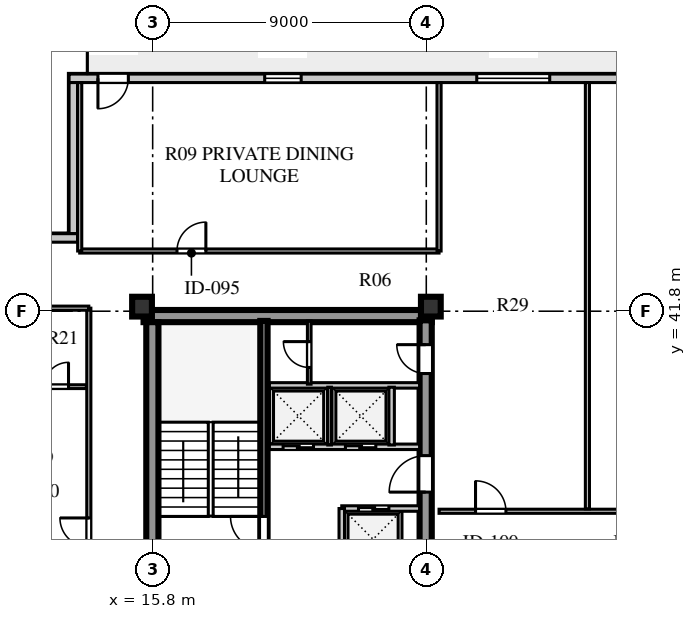
"""IFC4 building model, lengths in metres.
Left out: names, types, materials, properties, quantities, classifications, styles, units other than length and angle.
Written with IfcOpenShell. Run it as: python <this file> out.ifc"""

import sys

from ifc_helpers import new_model, si_unit, direction, frame, frame_2d, origin, origin_2d, place, context, subcontext, project, spatial, rectangle, extrude, element, fill, save


model = new_model("IFC4")
c1 = context("Model", 3, precision=1e-05, world=origin(), true_north=direction((0.0, 1.0)))
c2 = subcontext(c1, "Body", "Model", "MODEL_VIEW")
j1 = project(units=[si_unit("LENGTHUNIT", "METRE"), si_unit("PLANEANGLEUNIT", "RADIAN")], contexts=[c1])
p1 = place(None, origin())
s1 = spatial("IfcSite", under=j1, at=p1, CompositionType="ELEMENT")
p2 = place(p1, origin())
s2 = spatial("IfcBuilding", under=s1, at=p2, CompositionType="ELEMENT")
p3 = place(p2, frame((0.0, 0.0, 229.7)))
s3 = spatial("IfcBuildingStorey", under=s2, at=p3, CompositionType="ELEMENT", Elevation=229.7)
p4 = place(p3, frame((15.5, 41.64, 0.0), z_axis=(0.0, 0.0, 1.0), x_axis=(1.0, 0.0, 0.0)))
e1 = element("IfcWall", 1, at=p4, inside=s3, PredefinedType="SHEAR", context=c2, shape_type="SweptSolid", body=[
    extrude(rectangle(XDim=9.48, YDim=0.4, at=frame_2d((4.74, 0.0))), origin(), (0.0, 0.0, 1.0), 3.66),
])
p5 = place(p3, frame((15.79, 15.81, 0.0), z_axis=(0.0, 0.0, 1.0), x_axis=(0.0, 1.0, 0.0)))
e2 = element("IfcWall", 2, at=p5, inside=s3, PredefinedType="SHEAR", context=c2, shape_type="SweptSolid", body=[
    extrude(rectangle(XDim=25.63, YDim=0.4, at=frame_2d((12.815, 0.0))), origin(), (0.0, 0.0, 1.0), 3.66),
])
p6 = place(p3, frame((24.78, 15.74, 0.0), z_axis=(0.0, 0.0, 1.0), x_axis=(0.0, 1.0, 0.0)))
e3 = element("IfcWall", 3, at=p6, inside=s3, PredefinedType="SHEAR", context=c2, shape_type="SweptSolid", body=[
    extrude(rectangle(XDim=25.76, YDim=0.4, at=frame_2d((12.88, 0.0))), origin(), (0.0, 0.0, 1.0), 3.66),
])
p7 = place(p6, frame((1.61, 0.0, 0.0)))
e4 = element("IfcOpeningElement", 4, at=p7, cuts=e3, PredefinedType="OPENING", context=c2, shape_type="SweptSolid", body=[
    extrude(rectangle(XDim=1.2, YDim=2.1, at=frame_2d((0.6, 1.05))), frame((0.0, 0.21, 0.0), z_axis=(0.0, -1.0, 0.0), x_axis=(1.0, 0.0, 0.0)), (0.0, 0.0, 1.0), 0.42),
])
p8 = place(p6, frame((6.78, 0.0, 0.0)))
e5 = element("IfcOpeningElement", 5, at=p8, cuts=e3, PredefinedType="OPENING", context=c2, shape_type="SweptSolid", body=[
    extrude(rectangle(XDim=0.85, YDim=2.06, at=frame_2d((0.425, 1.03))), frame((0.0, 0.21, 0.0), z_axis=(0.0, -1.0, 0.0), x_axis=(1.0, 0.0, 0.0)), (0.0, 0.0, 1.0), 0.42),
])
p9 = place(p6, frame((12.11, 0.0, 0.0)))
e6 = element("IfcOpeningElement", 6, at=p9, cuts=e3, PredefinedType="OPENING", context=c2, shape_type="SweptSolid", body=[
    extrude(rectangle(XDim=1.5, YDim=2.12, at=frame_2d((0.75, 1.06))), frame((0.0, 0.21, 0.0), z_axis=(0.0, -1.0, 0.0), x_axis=(1.0, 0.0, 0.0)), (0.0, 0.0, 1.0), 0.42),
])
p10 = place(p6, frame((20.11, 0.0, 0.0)))
e7 = element("IfcOpeningElement", 7, at=p10, cuts=e3, PredefinedType="OPENING", context=c2, shape_type="SweptSolid", body=[
    extrude(rectangle(XDim=1.2, YDim=2.12, at=frame_2d((0.6, 1.06))), frame((0.0, 0.21, 0.0), z_axis=(0.0, -1.0, 0.0), x_axis=(1.0, 0.0, 0.0)), (0.0, 0.0, 1.0), 0.42),
])
p11 = place(p6, frame((24.01, 0.0, 0.0)))
e8 = element("IfcOpeningElement", 8, at=p11, cuts=e3, PredefinedType="OPENING", context=c2, shape_type="SweptSolid", body=[
    extrude(rectangle(XDim=0.95, YDim=2.1, at=frame_2d((0.475, 1.05))), frame((0.0, 0.21, 0.0), z_axis=(0.0, -1.0, 0.0), x_axis=(1.0, 0.0, 0.0)), (0.0, 0.0, 1.0), 0.42),
])
for number, where, z_axis, x_axis in (
    (9, (15.45, 41.95, 0.0), (0.0, 0.0, 1.0), (1.0, 0.0, 0.0)),
    (10, (24.95, 41.95, 0.0), (0.0, 0.0, 1.0), (1.0, 0.0, 0.0)),
):
    element("IfcColumn", number, at=place(p3, frame(where, z_axis=z_axis, x_axis=x_axis)), inside=s3, PredefinedType="COLUMN", context=c2, shape_type="SweptSolid", body=[
        extrude(rectangle(XDim=0.65, YDim=0.65, at=origin_2d()), origin(), (0.0, 0.0, 1.0), 3.66),
    ])
p12 = place(p3, frame((45.55, 49.46, 0.0), z_axis=(0.0, 0.0, 1.0), x_axis=(-1.0, 0.0, 0.0)))
e11 = element("IfcWall", 11, at=p12, inside=s3, PredefinedType="STANDARD", context=c2, shape_type="SweptSolid", body=[
    extrude(rectangle(XDim=32.5, YDim=0.28, at=frame_2d((16.25, 0.0))), origin(), (0.0, 0.0, 1.0), 3.66),
])
p13 = place(p12, frame((30.55, 0.0, 0.0)))
e12 = element("IfcOpeningElement", 12, at=p13, cuts=e11, PredefinedType="OPENING", context=c2, shape_type="SweptSolid", body=[
    extrude(rectangle(XDim=1.0, YDim=2.05, at=frame_2d((0.5, 1.025))), frame((0.0, 0.15, 0.0), z_axis=(0.0, -1.0, 0.0), x_axis=(1.0, 0.0, 0.0)), (0.0, 0.0, 1.0), 0.3),
])
p14 = place(p12, frame((24.865, 0.0, 0.8)))
e13 = element("IfcOpeningElement", 13, at=p14, cuts=e11, PredefinedType="OPENING", context=c2, shape_type="SweptSolid", body=[
    extrude(rectangle(XDim=1.2, YDim=1.75, at=frame_2d((0.6, 0.875))), frame((0.0, 0.15, 0.0), z_axis=(0.0, -1.0, 0.0), x_axis=(1.0, 0.0, 0.0)), (0.0, 0.0, 1.0), 0.3),
])
p15 = place(p12, frame((16.69, 0.0, 0.8)))
e14 = element("IfcOpeningElement", 14, at=p15, cuts=e11, PredefinedType="OPENING", context=c2, shape_type="SweptSolid", body=[
    extrude(rectangle(XDim=2.4, YDim=2.05, at=frame_2d((1.2, 1.025))), frame((0.0, 0.15, 0.0), z_axis=(0.0, -1.0, 0.0), x_axis=(1.0, 0.0, 0.0)), (0.0, 0.0, 1.0), 0.3),
])
p16 = place(p12, frame((12.09, 0.0, 0.8)))
e15 = element("IfcOpeningElement", 15, at=p16, cuts=e11, PredefinedType="OPENING", context=c2, shape_type="SweptSolid", body=[
    extrude(rectangle(XDim=2.1, YDim=1.95, at=frame_2d((1.05, 0.975))), frame((0.0, 0.15, 0.0), z_axis=(0.0, -1.0, 0.0), x_axis=(1.0, 0.0, 0.0)), (0.0, 0.0, 1.0), 0.3),
])
p17 = place(p12, frame((4.795, 0.0, 0.8)))
e16 = element("IfcOpeningElement", 16, at=p17, cuts=e11, PredefinedType="OPENING", context=c2, shape_type="SweptSolid", body=[
    extrude(rectangle(XDim=1.35, YDim=1.9, at=frame_2d((0.675, 0.95))), frame((0.0, 0.15, 0.0), z_axis=(0.0, -1.0, 0.0), x_axis=(1.0, 0.0, 0.0)), (0.0, 0.0, 1.0), 0.3),
])
p18 = place(p3, frame((13.19, 49.32, 0.0), z_axis=(0.0, 0.0, 1.0), x_axis=(0.0, -1.0, 0.0)))
e17 = element("IfcWall", 17, at=p18, inside=s3, PredefinedType="STANDARD", context=c2, shape_type="SweptSolid", body=[
    extrude(rectangle(XDim=4.97, YDim=0.28, at=frame_2d((2.485, 0.0))), origin(), (0.0, 0.0, 1.0), 3.66),
])
p19 = place(p3, frame((13.33, 44.21, 0.0), z_axis=(0.0, 0.0, 1.0), x_axis=(-1.0, 0.0, 0.0)))
e18 = element("IfcWall", 18, at=p19, inside=s3, PredefinedType="STANDARD", context=c2, shape_type="SweptSolid", body=[
    extrude(rectangle(XDim=5.53, YDim=0.28, at=frame_2d((2.765, 0.0))), origin(), (0.0, 0.0, 1.0), 3.66),
])
p20 = place(p3, frame((19.46, 33.3, 0.0), z_axis=(0.0, 0.0, 1.0), x_axis=(0.0, 1.0, 0.0)))
e19 = element("IfcWall", 19, at=p20, inside=s3, PredefinedType="SHEAR", context=c2, shape_type="SweptSolid", body=[
    extrude(rectangle(XDim=8.18, YDim=0.24, at=frame_2d((4.09, 0.0))), origin(), (0.0, 0.0, 1.0), 3.9),
])
p21 = place(p20, frame((0.65, 0.0, 0.0)))
e20 = element("IfcOpeningElement", 20, at=p21, cuts=e19, PredefinedType="OPENING", context=c2, shape_type="SweptSolid", body=[
    extrude(rectangle(XDim=1.1, YDim=2.1, at=frame_2d((0.55, 1.05))), frame((0.0, 0.13, 0.0), z_axis=(0.0, -1.0, 0.0), x_axis=(1.0, 0.0, 0.0)), (0.0, 0.0, 1.0), 0.26),
])
p22 = place(p3, frame((22.02, 35.31, 0.0), z_axis=(0.0, 0.0, 1.0), x_axis=(1.0, 0.0, 0.0)))
e21 = element("IfcWall", 21, at=p22, inside=s3, PredefinedType="SOLIDWALL", context=c2, shape_type="SweptSolid", body=[
    extrude(rectangle(XDim=2.56, YDim=0.18, at=frame_2d((1.28, 0.0))), origin(), (0.0, 0.0, 1.0), 3.66),
])
p23 = place(p22, frame((0.55, 0.0, 0.0)))
e22 = element("IfcOpeningElement", 22, at=p23, cuts=e21, PredefinedType="OPENING", context=c2, shape_type="SweptSolid", body=[
    extrude(rectangle(XDim=1.0, YDim=2.1, at=frame_2d((0.5, 1.05))), frame((0.0, 0.1, 0.0), z_axis=(0.0, -1.0, 0.0), x_axis=(1.0, 0.0, 0.0)), (0.0, 0.0, 1.0), 0.2),
])
p24 = place(p3, frame((22.02, 33.3, 0.0), z_axis=(0.0, 0.0, 1.0), x_axis=(0.0, 1.0, 0.0)))
e23 = element("IfcWall", 23, at=p24, inside=s3, PredefinedType="SOLIDWALL", context=c2, shape_type="SweptSolid", body=[
    extrude(rectangle(XDim=2.01, YDim=0.18, at=frame_2d((1.005, 0.0))), origin(), (0.0, 0.0, 1.0), 3.66),
])
p25 = place(p3, frame((19.64, 37.34, 0.0), z_axis=(0.0, 0.0, 1.0), x_axis=(1.0, 0.0, 0.0)))
e24 = element("IfcWall", 24, at=p25, inside=s3, PredefinedType="SOLIDWALL", context=c2, shape_type="SweptSolid", body=[
    extrude(rectangle(XDim=4.94, YDim=0.18, at=frame_2d((2.47, 0.0))), origin(), (0.0, 0.0, 1.0), 3.66),
])
p26 = place(p25, frame((0.45, 0.0, 0.0)))
e25 = element("IfcOpeningElement", 25, at=p26, cuts=e24, PredefinedType="OPENING", context=c2, shape_type="SweptSolid", body=[
    extrude(rectangle(XDim=1.0, YDim=2.1, at=frame_2d((0.5, 1.05))), frame((0.0, 0.1, 0.0), z_axis=(0.0, -1.0, 0.0), x_axis=(1.0, 0.0, 0.0)), (0.0, 0.0, 1.0), 0.2),
])
p27 = place(p25, frame((2.5, 0.0, 0.0)))
e26 = element("IfcOpeningElement", 26, at=p27, cuts=e24, PredefinedType="OPENING", context=c2, shape_type="SweptSolid", body=[
    extrude(rectangle(XDim=1.0, YDim=2.1, at=frame_2d((0.5, 1.05))), frame((0.0, 0.1, 0.0), z_axis=(0.0, -1.0, 0.0), x_axis=(1.0, 0.0, 0.0)), (0.0, 0.0, 1.0), 0.2),
])
p28 = place(p3, frame((19.64, 39.36, 0.0), z_axis=(0.0, 0.0, 1.0), x_axis=(1.0, 0.0, 0.0)))
e27 = element("IfcWall", 27, at=p28, inside=s3, PredefinedType="SOLIDWALL", context=c2, shape_type="SweptSolid", body=[
    extrude(rectangle(XDim=4.94, YDim=0.18, at=frame_2d((2.47, 0.0))), origin(), (0.0, 0.0, 1.0), 3.66),
])
p29 = place(p3, frame((21.62, 37.4, 0.0), z_axis=(0.0, 0.0, 1.0), x_axis=(0.0, 1.0, 0.0)))
e28 = element("IfcWall", 28, at=p29, inside=s3, PredefinedType="PARTITIONING", context=c2, shape_type="SweptSolid", body=[
    extrude(rectangle(XDim=1.9, YDim=0.12, at=frame_2d((0.95, 0.0))), origin(), (0.0, 0.0, 1.0), 3.66),
])
p30 = place(p3, frame((23.66, 37.4, 0.0), z_axis=(0.0, 0.0, 1.0), x_axis=(0.0, 1.0, 0.0)))
e29 = element("IfcWall", 29, at=p30, inside=s3, PredefinedType="SOLIDWALL", context=c2, shape_type="SweptSolid", body=[
    extrude(rectangle(XDim=1.9, YDim=0.18, at=frame_2d((0.95, 0.0))), origin(), (0.0, 0.0, 1.0), 3.66),
])
p31 = place(p3, frame((20.95, 39.4, 0.0), z_axis=(0.0, 0.0, 1.0), x_axis=(0.0, 1.0, 0.0)))
e30 = element("IfcWall", 30, at=p31, inside=s3, PredefinedType="PARTITIONING", context=c2, shape_type="SweptSolid", body=[
    extrude(rectangle(XDim=2.08, YDim=0.12, at=frame_2d((1.04, 0.0))), origin(), (0.0, 0.0, 1.0), 3.66),
])
p32 = place(p31, frame((0.55, 0.0, 0.0)))
e31 = element("IfcOpeningElement", 31, at=p32, cuts=e30, PredefinedType="OPENING", context=c2, shape_type="SweptSolid", body=[
    extrude(rectangle(XDim=0.85, YDim=2.06, at=frame_2d((0.425, 1.03))), frame((0.0, 0.07, 0.0), z_axis=(0.0, -1.0, 0.0), x_axis=(1.0, 0.0, 0.0)), (0.0, 0.0, 1.0), 0.14),
])
p33 = place(p3, frame((25.22, 35.22, 0.0), z_axis=(0.0, 0.0, 1.0), x_axis=(1.0, 0.0, 0.0)))
e32 = element("IfcWall", 32, at=p33, inside=s3, PredefinedType="PARTITIONING", context=c2, shape_type="SweptSolid", body=[
    extrude(rectangle(XDim=9.5, YDim=0.135, at=frame_2d((4.75, 0.0))), origin(), (0.0, 0.0, 1.0), 3.66),
])
p34 = place(p33, frame((1.2, 0.0, 0.0)))
e33 = element("IfcOpeningElement", 33, at=p34, cuts=e32, PredefinedType="OPENING", context=c2, shape_type="SweptSolid", body=[
    extrude(rectangle(XDim=1.0, YDim=2.08, at=frame_2d((0.5, 1.04))), frame((0.0, 0.078, 0.0), z_axis=(0.0, -1.0, 0.0), x_axis=(1.0, 0.0, 0.0)), (0.0, 0.0, 1.0), 0.155),
])
p35 = place(p33, frame((6.2, 0.0, 0.0)))
e34 = element("IfcOpeningElement", 34, at=p35, cuts=e32, PredefinedType="OPENING", context=c2, shape_type="SweptSolid", body=[
    extrude(rectangle(XDim=0.9, YDim=2.08, at=frame_2d((0.45, 1.04))), frame((0.0, 0.078, 0.0), z_axis=(0.0, -1.0, 0.0), x_axis=(1.0, 0.0, 0.0)), (0.0, 0.0, 1.0), 0.155),
])
p36 = place(p3, frame((13.4, 43.78, 0.0), z_axis=(0.0, 0.0, 1.0), x_axis=(1.0, 0.0, 0.0)))
e35 = element("IfcWall", 35, at=p36, inside=s3, PredefinedType="PARTITIONING", context=c2, shape_type="SweptSolid", body=[
    extrude(rectangle(XDim=11.82, YDim=0.135, at=frame_2d((5.91, 0.0))), origin(), (0.0, 0.0, 1.0), 3.66),
])
p37 = place(p36, frame((3.2, 0.0, 0.0)))
e36 = element("IfcOpeningElement", 36, at=p37, cuts=e35, PredefinedType="OPENING", context=c2, shape_type="SweptSolid", body=[
    extrude(rectangle(XDim=0.95, YDim=2.08, at=frame_2d((0.475, 1.04))), frame((0.0, 0.078, 0.0), z_axis=(0.0, -1.0, 0.0), x_axis=(1.0, 0.0, 0.0)), (0.0, 0.0, 1.0), 0.155),
])
p38 = place(p3, frame((13.4, 43.78, 0.0), z_axis=(0.0, 0.0, 1.0), x_axis=(0.0, 1.0, 0.0)))
e37 = element("IfcWall", 37, at=p38, inside=s3, PredefinedType="PARTITIONING", context=c2, shape_type="SweptSolid", body=[
    extrude(rectangle(XDim=5.54, YDim=0.135, at=frame_2d((2.77, 0.0))), origin(), (0.0, 0.0, 1.0), 3.66),
])
p39 = place(p3, frame((25.22, 43.78, 0.0), z_axis=(0.0, 0.0, 1.0), x_axis=(0.0, 1.0, 0.0)))
e38 = element("IfcWall", 38, at=p39, inside=s3, PredefinedType="PARTITIONING", context=c2, shape_type="SweptSolid", body=[
    extrude(rectangle(XDim=5.54, YDim=0.135, at=frame_2d((2.77, 0.0))), origin(), (0.0, 0.0, 1.0), 3.21),
])
p40 = place(p3, frame((13.7, 15.3, 0.0), z_axis=(0.0, 0.0, 1.0), x_axis=(0.0, 1.0, 0.0)))
e39 = element("IfcWall", 39, at=p40, inside=s3, PredefinedType="PARTITIONING", context=c2, shape_type="SweptSolid", body=[
    extrude(rectangle(XDim=26.6, YDim=0.135, at=frame_2d((13.3, 0.0))), origin(), (0.0, 0.0, 1.0), 3.66),
])
p41 = place(p40, frame((0.65, 0.0, 0.0)))
e40 = element("IfcOpeningElement", 40, at=p41, cuts=e39, PredefinedType="OPENING", context=c2, shape_type="SweptSolid", body=[
    extrude(rectangle(XDim=0.95, YDim=2.1, at=frame_2d((0.475, 1.05))), frame((0.0, 0.078, 0.0), z_axis=(0.0, -1.0, 0.0), x_axis=(1.0, 0.0, 0.0)), (0.0, 0.0, 1.0), 0.155),
])
p42 = place(p40, frame((9.8, 0.0, 0.0)))
e41 = element("IfcOpeningElement", 41, at=p42, cuts=e39, PredefinedType="OPENING", context=c2, shape_type="SweptSolid", body=[
    extrude(rectangle(XDim=0.95, YDim=2.1, at=frame_2d((0.475, 1.05))), frame((0.0, 0.078, 0.0), z_axis=(0.0, -1.0, 0.0), x_axis=(1.0, 0.0, 0.0)), (0.0, 0.0, 1.0), 0.155),
])
p43 = place(p40, frame((18.75, 0.0, 0.0)))
e42 = element("IfcOpeningElement", 42, at=p43, cuts=e39, PredefinedType="OPENING", context=c2, shape_type="SweptSolid", body=[
    extrude(rectangle(XDim=0.95, YDim=2.1, at=frame_2d((0.475, 1.05))), frame((0.0, 0.078, 0.0), z_axis=(0.0, -1.0, 0.0), x_axis=(1.0, 0.0, 0.0)), (0.0, 0.0, 1.0), 0.155),
])
p44 = place(p3, frame((8.08, 41.9, 0.0), z_axis=(0.0, 0.0, 1.0), x_axis=(1.0, 0.0, 0.0)))
e43 = element("IfcWall", 43, at=p44, inside=s3, PredefinedType="PARTITIONING", context=c2, shape_type="SweptSolid", body=[
    extrude(rectangle(XDim=5.62, YDim=0.135, at=frame_2d((2.81, 0.0))), origin(), (0.0, 0.0, 1.0), 3.21),
])
p45 = place(p3, frame((10.45, 39.318, 0.0), z_axis=(0.0, 0.0, 1.0), x_axis=(1.0, 0.0, 0.0)))
e44 = element("IfcWall", 44, at=p45, inside=s3, PredefinedType="PLUMBINGWALL", context=c2, shape_type="SweptSolid", body=[
    extrude(rectangle(XDim=3.17, YDim=0.125, at=frame_2d((1.585, 0.0))), origin(), (0.0, 0.0, 1.0), 3.66),
])
p46 = place(p45, frame((0.16, 0.0, 0.0)))
e45 = element("IfcOpeningElement", 45, at=p46, cuts=e44, PredefinedType="OPENING", context=c2, shape_type="SweptSolid", body=[
    extrude(rectangle(XDim=0.8, YDim=2.05, at=frame_2d((0.4, 1.025))), frame((0.0, 0.073, 0.0), z_axis=(0.0, -1.0, 0.0), x_axis=(1.0, 0.0, 0.0)), (0.0, 0.0, 1.0), 0.145),
])
p47 = place(p45, frame((1.782, 0.0, 0.0)))
e46 = element("IfcOpeningElement", 46, at=p47, cuts=e44, PredefinedType="OPENING", context=c2, shape_type="SweptSolid", body=[
    extrude(rectangle(XDim=0.8, YDim=2.05, at=frame_2d((0.4, 1.025))), frame((0.0, 0.073, 0.0), z_axis=(0.0, -1.0, 0.0), x_axis=(1.0, 0.0, 0.0)), (0.0, 0.0, 1.0), 0.145),
])
p48 = place(p3, frame((30.1, 35.3, 0.0), z_axis=(0.0, 0.0, 1.0), x_axis=(0.0, 1.0, 0.0)))
e47 = element("IfcWall", 47, at=p48, inside=s3, PredefinedType="PARTITIONING", context=c2, shape_type="SweptSolid", body=[
    extrude(rectangle(XDim=14.02, YDim=0.135, at=frame_2d((7.01, 0.0))), origin(), (0.0, 0.0, 1.0), 3.66),
])
p49 = place(p13, frame((1.0, 0.0, 0.0), z_axis=(0.0, 0.0, 1.0), x_axis=(-1.0, 0.0, 0.0)))
e48 = element("IfcDoor", 48, at=p49, inside=s3, OperationType="SINGLE_SWING_LEFT", PredefinedType="DOOR", context=c2, shape_type="SweptSolid", body=[
    extrude(rectangle(XDim=1.0, YDim=2.05, at=frame_2d((0.5, 1.025))), frame((0.0, 0.025, 0.0), z_axis=(0.0, -1.0, 0.0), x_axis=(1.0, 0.0, 0.0)), (0.0, 0.0, 1.0), 0.05),
])
fill(e12, e48)
p50 = place(p14, origin())
e49 = element("IfcWindow", 49, at=p50, inside=s3, PartitioningType="SINGLE_PANEL", PredefinedType="WINDOW", context=c2, shape_type="SweptSolid", body=[
    extrude(rectangle(XDim=1.2, YDim=1.75, at=frame_2d((0.6, 0.875))), frame((0.0, 0.03, 0.0), z_axis=(0.0, -1.0, 0.0), x_axis=(1.0, 0.0, 0.0)), (0.0, 0.0, 1.0), 0.06),
])
fill(e13, e49)
p51 = place(p15, origin())
e50 = element("IfcWindow", 50, at=p51, inside=s3, PartitioningType="SINGLE_PANEL", PredefinedType="WINDOW", context=c2, shape_type="SweptSolid", body=[
    extrude(rectangle(XDim=2.4, YDim=2.05, at=frame_2d((1.2, 1.025))), frame((0.0, 0.03, 0.0), z_axis=(0.0, -1.0, 0.0), x_axis=(1.0, 0.0, 0.0)), (0.0, 0.0, 1.0), 0.06),
])
fill(e14, e50)
p52 = place(p21, origin())
e51 = element("IfcDoor", 51, at=p52, inside=s3, OperationType="SINGLE_SWING_RIGHT", PredefinedType="DOOR", context=c2, shape_type="SweptSolid", body=[
    extrude(rectangle(XDim=1.1, YDim=2.1, at=frame_2d((0.55, 1.05))), frame((0.0, 0.025, 0.0), z_axis=(0.0, -1.0, 0.0), x_axis=(1.0, 0.0, 0.0)), (0.0, 0.0, 1.0), 0.05),
])
fill(e20, e51)
p53 = place(p10, frame((1.2, 0.0, 0.0), z_axis=(0.0, 0.0, 1.0), x_axis=(-1.0, 0.0, 0.0)))
e52 = element("IfcDoor", 52, at=p53, inside=s3, OperationType="SINGLE_SWING_RIGHT", PredefinedType="DOOR", context=c2, shape_type="SweptSolid", body=[
    extrude(rectangle(XDim=1.2, YDim=2.12, at=frame_2d((0.6, 1.06))), frame((0.0, 0.025, 0.0), z_axis=(0.0, -1.0, 0.0), x_axis=(1.0, 0.0, 0.0)), (0.0, 0.0, 1.0), 0.05),
])
fill(e7, e52)
p54 = place(p26, frame((1.0, 0.0, 0.0), z_axis=(0.0, 0.0, 1.0), x_axis=(-1.0, 0.0, 0.0)))
e53 = element("IfcDoor", 53, at=p54, inside=s3, OperationType="DOUBLE_DOOR_SLIDING", PredefinedType="DOOR", context=c2, shape_type="SweptSolid", body=[
    extrude(rectangle(XDim=1.0, YDim=2.1, at=frame_2d((0.5, 1.05))), frame((0.0, 0.025, 0.0), z_axis=(0.0, -1.0, 0.0), x_axis=(1.0, 0.0, 0.0)), (0.0, 0.0, 1.0), 0.05),
])
fill(e25, e53)
p55 = place(p27, frame((1.0, 0.0, 0.0), z_axis=(0.0, 0.0, 1.0), x_axis=(-1.0, 0.0, 0.0)))
e54 = element("IfcDoor", 54, at=p55, inside=s3, OperationType="DOUBLE_DOOR_SLIDING", PredefinedType="DOOR", context=c2, shape_type="SweptSolid", body=[
    extrude(rectangle(XDim=1.0, YDim=2.1, at=frame_2d((0.5, 1.05))), frame((0.0, 0.025, 0.0), z_axis=(0.0, -1.0, 0.0), x_axis=(1.0, 0.0, 0.0)), (0.0, 0.0, 1.0), 0.05),
])
fill(e26, e54)
p56 = place(p23, origin())
e55 = element("IfcDoor", 55, at=p56, inside=s3, OperationType="DOUBLE_DOOR_SLIDING", PredefinedType="DOOR", context=c2, shape_type="SweptSolid", body=[
    extrude(rectangle(XDim=1.0, YDim=2.1, at=frame_2d((0.5, 1.05))), frame((0.0, 0.025, 0.0), z_axis=(0.0, -1.0, 0.0), x_axis=(1.0, 0.0, 0.0)), (0.0, 0.0, 1.0), 0.05),
])
fill(e22, e55)
p57 = place(p32, origin())
e56 = element("IfcDoor", 56, at=p57, inside=s3, OperationType="SINGLE_SWING_RIGHT", PredefinedType="DOOR", context=c2, shape_type="SweptSolid", body=[
    extrude(rectangle(XDim=0.85, YDim=2.06, at=frame_2d((0.425, 1.03))), frame((0.0, 0.025, 0.0), z_axis=(0.0, -1.0, 0.0), x_axis=(1.0, 0.0, 0.0)), (0.0, 0.0, 1.0), 0.05),
])
fill(e31, e56)
p58 = place(p11, frame((0.95, 0.0, 0.0), z_axis=(0.0, 0.0, 1.0), x_axis=(-1.0, 0.0, 0.0)))
e57 = element("IfcDoor", 57, at=p58, inside=s3, OperationType="SINGLE_SWING_LEFT", PredefinedType="DOOR", context=c2, shape_type="SweptSolid", body=[
    extrude(rectangle(XDim=0.95, YDim=2.1, at=frame_2d((0.475, 1.05))), frame((0.0, 0.025, 0.0), z_axis=(0.0, -1.0, 0.0), x_axis=(1.0, 0.0, 0.0)), (0.0, 0.0, 1.0), 0.05),
])
fill(e8, e57)
p59 = place(p37, origin())
e58 = element("IfcDoor", 58, at=p59, inside=s3, OperationType="SINGLE_SWING_RIGHT", PredefinedType="DOOR", context=c2, shape_type="SweptSolid", body=[
    extrude(rectangle(XDim=0.95, YDim=2.08, at=frame_2d((0.475, 1.04))), frame((0.0, 0.025, 0.0), z_axis=(0.0, -1.0, 0.0), x_axis=(1.0, 0.0, 0.0)), (0.0, 0.0, 1.0), 0.05),
])
fill(e36, e58)
p60 = place(p47, origin())
e59 = element("IfcDoor", 59, at=p60, inside=s3, OperationType="SINGLE_SWING_RIGHT", PredefinedType="DOOR", context=c2, shape_type="SweptSolid", body=[
    extrude(rectangle(XDim=0.8, YDim=2.05, at=frame_2d((0.4, 1.025))), frame((0.0, 0.025, 0.0), z_axis=(0.0, -1.0, 0.0), x_axis=(1.0, 0.0, 0.0)), (0.0, 0.0, 1.0), 0.05),
])
fill(e46, e59)
p61 = place(p43, frame((0.95, 0.0, 0.0), z_axis=(0.0, 0.0, 1.0), x_axis=(-1.0, 0.0, 0.0)))
e60 = element("IfcDoor", 60, at=p61, inside=s3, OperationType="SINGLE_SWING_LEFT", PredefinedType="DOOR", context=c2, shape_type="SweptSolid", body=[
    extrude(rectangle(XDim=0.95, YDim=2.1, at=frame_2d((0.475, 1.05))), frame((0.0, 0.025, 0.0), z_axis=(0.0, -1.0, 0.0), x_axis=(1.0, 0.0, 0.0)), (0.0, 0.0, 1.0), 0.05),
])
fill(e42, e60)
p62 = place(p34, origin())
e61 = element("IfcDoor", 61, at=p62, inside=s3, OperationType="SINGLE_SWING_LEFT", PredefinedType="DOOR", context=c2, shape_type="SweptSolid", body=[
    extrude(rectangle(XDim=1.0, YDim=2.08, at=frame_2d((0.5, 1.04))), frame((0.0, 0.025, 0.0), z_axis=(0.0, -1.0, 0.0), x_axis=(1.0, 0.0, 0.0)), (0.0, 0.0, 1.0), 0.05),
])
fill(e33, e61)
save(model, sys.argv[1])
